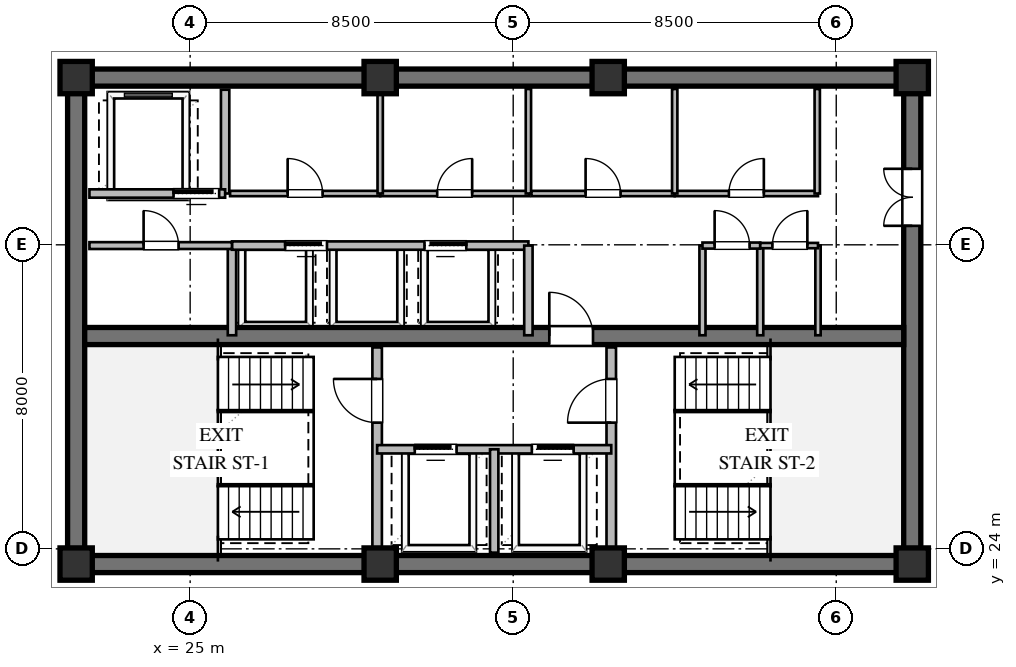
"""IFC4 building model, lengths in metres.
Left out: names, types, materials, properties, quantities, classifications, styles, units other than length and angle.
Written with IfcOpenShell. Run it as: python <this file> out.ifc"""

import sys

from ifc_helpers import new_model, si_unit, direction, frame, frame_2d, origin, origin_2d, place, context, subcontext, project, spatial, rectangle, extrude, element, fill, save


model = new_model("IFC4")
c1 = context("Model", 3, precision=1e-05, world=origin(), true_north=direction((0.0, 1.0)))
c2 = subcontext(c1, "Body", "Model", "MODEL_VIEW")
j1 = project(units=[si_unit("LENGTHUNIT", "METRE"), si_unit("PLANEANGLEUNIT", "RADIAN")], contexts=[c1])
p1 = place(None, origin())
s1 = spatial("IfcSite", under=j1, at=p1, CompositionType="ELEMENT")
p2 = place(p1, origin())
s2 = spatial("IfcBuilding", under=s1, at=p2, CompositionType="ELEMENT")
p3 = place(p2, frame((0.0, 0.0, 206.4)))
s3 = spatial("IfcBuildingStorey", under=s2, at=p3, CompositionType="ELEMENT", Elevation=206.4)
for number, where, z_axis, x_axis in (
    (1, (21.775, 23.6, 0.0), (0.0, 0.0, 1.0), (1.0, 0.0, 0.0)),
    (2, (21.775, 36.4, 0.0), (0.0, 0.0, 1.0), (1.0, 0.0, 0.0)),
):
    element("IfcWall", number, at=place(p3, frame(where, z_axis=z_axis, x_axis=x_axis)), inside=s3, PredefinedType="SHEAR", context=c2, shape_type="SweptSolid", body=[
        extrude(rectangle(XDim=22.45, YDim=0.45, at=frame_2d((11.225, 0.0))), origin(), (0.0, 0.0, 1.0), 3.36),
    ])
p4 = place(p3, frame((22.0, 23.825, 0.0), z_axis=(0.0, 0.0, 1.0), x_axis=(0.0, 1.0, 0.0)))
e3 = element("IfcWall", 3, at=p4, inside=s3, PredefinedType="SHEAR", context=c2, shape_type="SweptSolid", body=[
    extrude(rectangle(XDim=12.35, YDim=0.45, at=frame_2d((6.175, 0.0))), origin(), (0.0, 0.0, 1.0), 3.36),
])
p5 = place(p3, frame((44.0, 23.825, 0.0), z_axis=(0.0, 0.0, 1.0), x_axis=(0.0, 1.0, 0.0)))
e4 = element("IfcWall", 4, at=p5, inside=s3, PredefinedType="SHEAR", context=c2, shape_type="SweptSolid", body=[
    extrude(rectangle(XDim=12.35, YDim=0.45, at=frame_2d((6.175, 0.0))), origin(), (0.0, 0.0, 1.0), 3.36),
])
p6 = place(p5, frame((8.675, 0.0, 0.0)))
e5 = element("IfcOpeningElement", 5, at=p6, cuts=e4, PredefinedType="OPENING", context=c2, shape_type="SweptSolid", body=[
    extrude(rectangle(XDim=1.5, YDim=2.15, at=frame_2d((0.75, 1.075))), frame((0.0, 0.235, 0.0), z_axis=(0.0, -1.0, 0.0), x_axis=(1.0, 0.0, 0.0)), (0.0, 0.0, 1.0), 0.47),
])
p7 = place(p3, frame((22.225, 29.6, 0.0), z_axis=(0.0, 0.0, 1.0), x_axis=(1.0, 0.0, 0.0)))
e6 = element("IfcWall", 6, at=p7, inside=s3, PredefinedType="SHEAR", context=c2, shape_type="SweptSolid", body=[
    extrude(rectangle(XDim=21.55, YDim=0.45, at=frame_2d((10.775, 0.0))), origin(), (0.0, 0.0, 1.0), 3.36),
])
p8 = place(p7, frame((12.225, 0.0, 0.0)))
e7 = element("IfcOpeningElement", 7, at=p8, cuts=e6, PredefinedType="OPENING", context=c2, shape_type="SweptSolid", body=[
    extrude(rectangle(XDim=1.15, YDim=2.1, at=frame_2d((0.575, 1.05))), frame((0.0, 0.235, 0.0), z_axis=(0.0, -1.0, 0.0), x_axis=(1.0, 0.0, 0.0)), (0.0, 0.0, 1.0), 0.47),
])
for number, where, z_axis, x_axis in (
    (8, (22.0, 23.6, 0.0), (0.0, 0.0, 1.0), (1.0, 0.0, 0.0)),
    (9, (30.0, 23.6, 0.0), (0.0, 0.0, 1.0), (1.0, 0.0, 0.0)),
    (10, (36.0, 23.6, 0.0), (0.0, 0.0, 1.0), (1.0, 0.0, 0.0)),
    (11, (44.0, 23.6, 0.0), (0.0, 0.0, 1.0), (1.0, 0.0, 0.0)),
    (12, (44.0, 36.4, 0.0), (0.0, 0.0, 1.0), (1.0, 0.0, 0.0)),
    (13, (36.0, 36.4, 0.0), (0.0, 0.0, 1.0), (1.0, 0.0, 0.0)),
    (14, (30.0, 36.4, 0.0), (0.0, 0.0, 1.0), (1.0, 0.0, 0.0)),
    (15, (22.0, 36.4, 0.0), (0.0, 0.0, 1.0), (1.0, 0.0, 0.0)),
):
    element("IfcColumn", number, at=place(p3, frame(where, z_axis=z_axis, x_axis=x_axis)), inside=s3, PredefinedType="COLUMN", context=c2, shape_type="SweptSolid", body=[
        extrude(rectangle(XDim=0.85, YDim=0.85, at=origin_2d()), origin(), (0.0, 0.0, 1.0), 3.6),
    ])
p9 = place(p3, frame((29.92, 23.9, 0.0), z_axis=(0.0, 0.0, 1.0), x_axis=(0.0, 1.0, 0.0)))
e16 = element("IfcWall", 16, at=p9, inside=s3, PredefinedType="SOLIDWALL", context=c2, shape_type="SweptSolid", body=[
    extrude(rectangle(XDim=5.4, YDim=0.25, at=frame_2d((2.7, 0.0))), origin(), (0.0, 0.0, 1.0), 3.36),
])
p10 = place(p9, frame((3.421, 0.0, 0.0)))
e17 = element("IfcOpeningElement", 17, at=p10, cuts=e16, PredefinedType="OPENING", context=c2, shape_type="SweptSolid", body=[
    extrude(rectangle(XDim=1.15, YDim=2.1, at=frame_2d((0.575, 1.05))), frame((0.0, 0.135, 0.0), z_axis=(0.0, -1.0, 0.0), x_axis=(1.0, 0.0, 0.0)), (0.0, 0.0, 1.0), 0.27),
])
p11 = place(p3, frame((36.08, 23.9, 0.0), z_axis=(0.0, 0.0, 1.0), x_axis=(0.0, 1.0, 0.0)))
e18 = element("IfcWall", 18, at=p11, inside=s3, PredefinedType="SOLIDWALL", context=c2, shape_type="SweptSolid", body=[
    extrude(rectangle(XDim=5.4, YDim=0.25, at=frame_2d((2.7, 0.0))), origin(), (0.0, 0.0, 1.0), 3.36),
])
p12 = place(p11, frame((3.421, 0.0, 0.0)))
e19 = element("IfcOpeningElement", 19, at=p12, cuts=e18, PredefinedType="OPENING", context=c2, shape_type="SweptSolid", body=[
    extrude(rectangle(XDim=1.15, YDim=2.1, at=frame_2d((0.575, 1.05))), frame((0.0, 0.135, 0.0), z_axis=(0.0, -1.0, 0.0), x_axis=(1.0, 0.0, 0.0)), (0.0, 0.0, 1.0), 0.27),
])
p13 = place(p3, frame((29.92, 26.62, 0.0), z_axis=(0.0, 0.0, 1.0), x_axis=(1.0, 0.0, 0.0)))
e20 = element("IfcWall", 20, at=p13, inside=s3, PredefinedType="SOLIDWALL", context=c2, shape_type="SweptSolid", body=[
    extrude(rectangle(XDim=6.16, YDim=0.22, at=frame_2d((3.08, 0.0))), origin(), (0.0, 0.0, 1.0), 3.36),
])
p14 = place(p13, frame((0.99, 0.0, 0.0)))
e21 = element("IfcOpeningElement", 21, at=p14, cuts=e20, PredefinedType="OPENING", context=c2, shape_type="SweptSolid", body=[
    extrude(rectangle(XDim=1.1, YDim=2.1, at=frame_2d((0.55, 1.05))), frame((0.0, 0.12, 0.0), z_axis=(0.0, -1.0, 0.0), x_axis=(1.0, 0.0, 0.0)), (0.0, 0.0, 1.0), 0.24),
])
p15 = place(p13, frame((4.07, 0.0, 0.0)))
e22 = element("IfcOpeningElement", 22, at=p15, cuts=e20, PredefinedType="OPENING", context=c2, shape_type="SweptSolid", body=[
    extrude(rectangle(XDim=1.1, YDim=2.1, at=frame_2d((0.55, 1.05))), frame((0.0, 0.12, 0.0), z_axis=(0.0, -1.0, 0.0), x_axis=(1.0, 0.0, 0.0)), (0.0, 0.0, 1.0), 0.24),
])
p16 = place(p3, frame((33.0, 23.9, 0.0), z_axis=(0.0, 0.0, 1.0), x_axis=(0.0, 1.0, 0.0)))
e23 = element("IfcWall", 23, at=p16, inside=s3, PredefinedType="SOLIDWALL", context=c2, shape_type="SweptSolid", body=[
    extrude(rectangle(XDim=2.72, YDim=0.22, at=frame_2d((1.36, 0.0))), origin(), (0.0, 0.0, 1.0), 3.36),
])
p17 = place(p3, frame((25.92, 33.35, 0.0), z_axis=(0.0, 0.0, 1.0), x_axis=(0.0, 1.0, 0.0)))
e24 = element("IfcWall", 24, at=p17, inside=s3, PredefinedType="SOLIDWALL", context=c2, shape_type="SweptSolid", body=[
    extrude(rectangle(XDim=2.73, YDim=0.22, at=frame_2d((1.365, 0.0))), origin(), (0.0, 0.0, 1.0), 3.36),
])
p18 = place(p3, frame((22.35, 33.35, 0.0), z_axis=(0.0, 0.0, 1.0), x_axis=(1.0, 0.0, 0.0)))
e25 = element("IfcWall", 25, at=p18, inside=s3, PredefinedType="SOLIDWALL", context=c2, shape_type="SweptSolid", body=[
    extrude(rectangle(XDim=3.57, YDim=0.22, at=frame_2d((1.785, 0.0))), origin(), (0.0, 0.0, 1.0), 3.36),
])
p19 = place(p18, frame((2.213, 0.0, 0.0)))
e26 = element("IfcOpeningElement", 26, at=p19, cuts=e25, PredefinedType="OPENING", context=c2, shape_type="SweptSolid", body=[
    extrude(rectangle(XDim=1.2, YDim=2.1, at=frame_2d((0.6, 1.05))), frame((0.0, 0.12, 0.0), z_axis=(0.0, -1.0, 0.0), x_axis=(1.0, 0.0, 0.0)), (0.0, 0.0, 1.0), 0.24),
])
p20 = place(p3, frame((26.1, 29.62, 0.0), z_axis=(0.0, 0.0, 1.0), x_axis=(0.0, 1.0, 0.0)))
e27 = element("IfcWall", 27, at=p20, inside=s3, PredefinedType="SOLIDWALL", context=c2, shape_type="SweptSolid", body=[
    extrude(rectangle(XDim=2.36, YDim=0.22, at=frame_2d((1.18, 0.0))), origin(), (0.0, 0.0, 1.0), 3.36),
])
p21 = place(p3, frame((26.1, 31.98, 0.0), z_axis=(0.0, 0.0, 1.0), x_axis=(1.0, 0.0, 0.0)))
e28 = element("IfcWall", 28, at=p21, inside=s3, PredefinedType="SOLIDWALL", context=c2, shape_type="SweptSolid", body=[
    extrude(rectangle(XDim=7.8, YDim=0.22, at=frame_2d((3.9, 0.0))), origin(), (0.0, 0.0, 1.0), 3.36),
])
p22 = place(p21, frame((1.4, 0.0, 0.0)))
e29 = element("IfcOpeningElement", 29, at=p22, cuts=e28, PredefinedType="OPENING", context=c2, shape_type="SweptSolid", body=[
    extrude(rectangle(XDim=1.1, YDim=2.1, at=frame_2d((0.55, 1.05))), frame((0.0, 0.12, 0.0), z_axis=(0.0, -1.0, 0.0), x_axis=(1.0, 0.0, 0.0)), (0.0, 0.0, 1.0), 0.24),
])
p23 = place(p21, frame((5.066, 0.0, 0.0)))
e30 = element("IfcOpeningElement", 30, at=p23, cuts=e28, PredefinedType="OPENING", context=c2, shape_type="SweptSolid", body=[
    extrude(rectangle(XDim=1.1, YDim=2.1, at=frame_2d((0.55, 1.05))), frame((0.0, 0.12, 0.0), z_axis=(0.0, -1.0, 0.0), x_axis=(1.0, 0.0, 0.0)), (0.0, 0.0, 1.0), 0.24),
])
p24 = place(p3, frame((33.9, 29.62, 0.0), z_axis=(0.0, 0.0, 1.0), x_axis=(0.0, 1.0, 0.0)))
e31 = element("IfcWall", 31, at=p24, inside=s3, PredefinedType="SOLIDWALL", context=c2, shape_type="SweptSolid", body=[
    extrude(rectangle(XDim=2.36, YDim=0.22, at=frame_2d((1.18, 0.0))), origin(), (0.0, 0.0, 1.0), 3.36),
])
p25 = place(p3, frame((26.05, 33.35, 0.0), z_axis=(0.0, 0.0, 1.0), x_axis=(1.0, 0.0, 0.0)))
e32 = element("IfcWall", 32, at=p25, inside=s3, PredefinedType="PARTITIONING", context=c2, shape_type="SweptSolid", body=[
    extrude(rectangle(XDim=3.95, YDim=0.14, at=frame_2d((1.975, 0.0))), origin(), (0.0, 0.0, 1.0), 3.36),
])
p26 = place(p25, frame((1.515, 0.0, 0.0)))
e33 = element("IfcOpeningElement", 33, at=p26, cuts=e32, PredefinedType="OPENING", context=c2, shape_type="SweptSolid", body=[
    extrude(rectangle(XDim=0.92, YDim=2.1, at=frame_2d((0.46, 1.05))), frame((0.0, 0.08, 0.0), z_axis=(0.0, -1.0, 0.0), x_axis=(1.0, 0.0, 0.0)), (0.0, 0.0, 1.0), 0.16),
])
p27 = place(p3, frame((30.0, 33.35, 0.0), z_axis=(0.0, 0.0, 1.0), x_axis=(1.0, 0.0, 0.0)))
e34 = element("IfcWall", 34, at=p27, inside=s3, PredefinedType="PARTITIONING", context=c2, shape_type="SweptSolid", body=[
    extrude(rectangle(XDim=3.92, YDim=0.14, at=frame_2d((1.96, 0.0))), origin(), (0.0, 0.0, 1.0), 3.36),
])
p28 = place(p27, frame((1.5, 0.0, 0.0)))
e35 = element("IfcOpeningElement", 35, at=p28, cuts=e34, PredefinedType="OPENING", context=c2, shape_type="SweptSolid", body=[
    extrude(rectangle(XDim=0.92, YDim=2.1, at=frame_2d((0.46, 1.05))), frame((0.0, 0.08, 0.0), z_axis=(0.0, -1.0, 0.0), x_axis=(1.0, 0.0, 0.0)), (0.0, 0.0, 1.0), 0.16),
])
for number, where, z_axis, x_axis in (
    (36, (30.0, 33.35, 0.0), (0.0, 0.0, 1.0), (0.0, 1.0, 0.0)),
    (37, (33.9, 33.35, 0.0), (0.0, 0.0, 1.0), (0.0, 1.0, 0.0)),
):
    element("IfcWall", number, at=place(p3, frame(where, z_axis=z_axis, x_axis=x_axis)), inside=s3, PredefinedType="PARTITIONING", context=c2, shape_type="SweptSolid", body=[
        extrude(rectangle(XDim=2.75, YDim=0.14, at=frame_2d((1.375, 0.0))), origin(), (0.0, 0.0, 1.0), 3.36),
    ])
p29 = place(p3, frame((33.98, 33.35, 0.0), z_axis=(0.0, 0.0, 1.0), x_axis=(1.0, 0.0, 0.0)))
e38 = element("IfcWall", 38, at=p29, inside=s3, PredefinedType="PARTITIONING", context=c2, shape_type="SweptSolid", body=[
    extrude(rectangle(XDim=3.77, YDim=0.14, at=frame_2d((1.885, 0.0))), origin(), (0.0, 0.0, 1.0), 3.36),
])
p30 = place(p29, frame((1.425, 0.0, 0.0)))
e39 = element("IfcOpeningElement", 39, at=p30, cuts=e38, PredefinedType="OPENING", context=c2, shape_type="SweptSolid", body=[
    extrude(rectangle(XDim=0.92, YDim=2.1, at=frame_2d((0.46, 1.05))), frame((0.0, 0.08, 0.0), z_axis=(0.0, -1.0, 0.0), x_axis=(1.0, 0.0, 0.0)), (0.0, 0.0, 1.0), 0.16),
])
p31 = place(p3, frame((37.75, 33.35, 0.0), z_axis=(0.0, 0.0, 1.0), x_axis=(1.0, 0.0, 0.0)))
e40 = element("IfcWall", 40, at=p31, inside=s3, PredefinedType="PARTITIONING", context=c2, shape_type="SweptSolid", body=[
    extrude(rectangle(XDim=3.77, YDim=0.14, at=frame_2d((1.885, 0.0))), origin(), (0.0, 0.0, 1.0), 3.36),
])
p32 = place(p31, frame((1.425, 0.0, 0.0)))
e41 = element("IfcOpeningElement", 41, at=p32, cuts=e40, PredefinedType="OPENING", context=c2, shape_type="SweptSolid", body=[
    extrude(rectangle(XDim=0.92, YDim=2.1, at=frame_2d((0.46, 1.05))), frame((0.0, 0.08, 0.0), z_axis=(0.0, -1.0, 0.0), x_axis=(1.0, 0.0, 0.0)), (0.0, 0.0, 1.0), 0.16),
])
for number, where, z_axis, x_axis in (
    (42, (37.75, 33.35, 0.0), (0.0, 0.0, 1.0), (0.0, 1.0, 0.0)),
    (43, (41.5, 33.35, 0.0), (0.0, 0.0, 1.0), (0.0, 1.0, 0.0)),
):
    element("IfcWall", number, at=place(p3, frame(where, z_axis=z_axis, x_axis=x_axis)), inside=s3, PredefinedType="PARTITIONING", context=c2, shape_type="SweptSolid", body=[
        extrude(rectangle(XDim=2.75, YDim=0.14, at=frame_2d((1.375, 0.0))), origin(), (0.0, 0.0, 1.0), 3.36),
    ])
p33 = place(p3, frame((22.35, 31.98, 0.0), z_axis=(0.0, 0.0, 1.0), x_axis=(1.0, 0.0, 0.0)))
e44 = element("IfcWall", 44, at=p33, inside=s3, PredefinedType="PARTITIONING", context=c2, shape_type="SweptSolid", body=[
    extrude(rectangle(XDim=3.75, YDim=0.18, at=frame_2d((1.875, 0.0))), origin(), (0.0, 0.0, 1.0), 3.36),
])
p34 = place(p33, frame((1.425, 0.0, 0.0)))
e45 = element("IfcOpeningElement", 45, at=p34, cuts=e44, PredefinedType="OPENING", context=c2, shape_type="SweptSolid", body=[
    extrude(rectangle(XDim=0.92, YDim=2.1, at=frame_2d((0.46, 1.05))), frame((0.0, 0.1, 0.0), z_axis=(0.0, -1.0, 0.0), x_axis=(1.0, 0.0, 0.0)), (0.0, 0.0, 1.0), 0.2),
])
for number, where, z_axis, x_axis in (
    (46, (38.48, 29.62, 0.0), (0.0, 0.0, 1.0), (0.0, 1.0, 0.0)),
    (47, (40.0, 29.62, 0.0), (0.0, 0.0, 1.0), (0.0, 1.0, 0.0)),
):
    element("IfcWall", number, at=place(p3, frame(where, z_axis=z_axis, x_axis=x_axis)), inside=s3, PredefinedType="PLUMBINGWALL", context=c2, shape_type="SweptSolid", body=[
        extrude(rectangle(XDim=2.36, YDim=0.16, at=frame_2d((1.18, 0.0))), origin(), (0.0, 0.0, 1.0), 3.36),
    ])
p35 = place(p3, frame((41.52, 29.62, 0.0), z_axis=(0.0, 0.0, 1.0), x_axis=(0.0, 1.0, 0.0)))
e48 = element("IfcWall", 48, at=p35, inside=s3, PredefinedType="PARTITIONING", context=c2, shape_type="SweptSolid", body=[
    extrude(rectangle(XDim=2.36, YDim=0.14, at=frame_2d((1.18, 0.0))), origin(), (0.0, 0.0, 1.0), 3.36),
])
p36 = place(p3, frame((38.48, 31.98, 0.0), z_axis=(0.0, 0.0, 1.0), x_axis=(1.0, 0.0, 0.0)))
e49 = element("IfcWall", 49, at=p36, inside=s3, PredefinedType="PLUMBINGWALL", context=c2, shape_type="SweptSolid", body=[
    extrude(rectangle(XDim=1.52, YDim=0.16, at=frame_2d((0.76, 0.0))), origin(), (0.0, 0.0, 1.0), 3.36),
])
p37 = place(p36, frame((0.32, 0.0, 0.0)))
e50 = element("IfcOpeningElement", 50, at=p37, cuts=e49, PredefinedType="OPENING", context=c2, shape_type="SweptSolid", body=[
    extrude(rectangle(XDim=0.92, YDim=2.1, at=frame_2d((0.46, 1.05))), frame((0.0, 0.09, 0.0), z_axis=(0.0, -1.0, 0.0), x_axis=(1.0, 0.0, 0.0)), (0.0, 0.0, 1.0), 0.18),
])
p38 = place(p3, frame((40.0, 31.98, 0.0), z_axis=(0.0, 0.0, 1.0), x_axis=(1.0, 0.0, 0.0)))
e51 = element("IfcWall", 51, at=p38, inside=s3, PredefinedType="PARTITIONING", context=c2, shape_type="SweptSolid", body=[
    extrude(rectangle(XDim=1.52, YDim=0.14, at=frame_2d((0.76, 0.0))), origin(), (0.0, 0.0, 1.0), 3.36),
])
p39 = place(p38, frame((0.32, 0.0, 0.0)))
e52 = element("IfcOpeningElement", 52, at=p39, cuts=e51, PredefinedType="OPENING", context=c2, shape_type="SweptSolid", body=[
    extrude(rectangle(XDim=0.92, YDim=2.1, at=frame_2d((0.46, 1.05))), frame((0.0, 0.08, 0.0), z_axis=(0.0, -1.0, 0.0), x_axis=(1.0, 0.0, 0.0)), (0.0, 0.0, 1.0), 0.16),
])
p40 = place(p10, origin())
e53 = element("IfcDoor", 53, at=p40, inside=s3, OperationType="SINGLE_SWING_RIGHT", PredefinedType="DOOR", context=c2, shape_type="SweptSolid", body=[
    extrude(rectangle(XDim=1.15, YDim=2.1, at=frame_2d((0.575, 1.05))), frame((0.0, 0.025, 0.0), z_axis=(0.0, -1.0, 0.0), x_axis=(1.0, 0.0, 0.0)), (0.0, 0.0, 1.0), 0.05),
])
fill(e17, e53)
p41 = place(p12, origin())
e54 = element("IfcDoor", 54, at=p41, inside=s3, OperationType="SINGLE_SWING_LEFT", PredefinedType="DOOR", context=c2, shape_type="SweptSolid", body=[
    extrude(rectangle(XDim=1.15, YDim=2.1, at=frame_2d((0.575, 1.05))), frame((0.0, 0.025, 0.0), z_axis=(0.0, -1.0, 0.0), x_axis=(1.0, 0.0, 0.0)), (0.0, 0.0, 1.0), 0.05),
])
fill(e19, e54)
p42 = place(p14, origin())
e55 = element("IfcDoor", 55, at=p42, inside=s3, OperationType="SLIDING_TO_LEFT", PredefinedType="DOOR", context=c2, shape_type="SweptSolid", body=[
    extrude(rectangle(XDim=1.1, YDim=2.1, at=frame_2d((0.55, 1.05))), frame((0.0, 0.025, 0.0), z_axis=(0.0, -1.0, 0.0), x_axis=(1.0, 0.0, 0.0)), (0.0, 0.0, 1.0), 0.05),
])
fill(e21, e55)
p43 = place(p15, origin())
e56 = element("IfcDoor", 56, at=p43, inside=s3, OperationType="SLIDING_TO_RIGHT", PredefinedType="DOOR", context=c2, shape_type="SweptSolid", body=[
    extrude(rectangle(XDim=1.1, YDim=2.1, at=frame_2d((0.55, 1.05))), frame((0.0, 0.025, 0.0), z_axis=(0.0, -1.0, 0.0), x_axis=(1.0, 0.0, 0.0)), (0.0, 0.0, 1.0), 0.05),
])
fill(e22, e56)
p44 = place(p8, origin())
e57 = element("IfcDoor", 57, at=p44, inside=s3, OperationType="SINGLE_SWING_LEFT", PredefinedType="DOOR", context=c2, shape_type="SweptSolid", body=[
    extrude(rectangle(XDim=1.15, YDim=2.1, at=frame_2d((0.575, 1.05))), frame((0.0, 0.025, 0.0), z_axis=(0.0, -1.0, 0.0), x_axis=(1.0, 0.0, 0.0)), (0.0, 0.0, 1.0), 0.05),
])
fill(e7, e57)
p45 = place(p6, origin())
e58 = element("IfcDoor", 58, at=p45, inside=s3, OperationType="DOUBLE_DOOR_SINGLE_SWING", PredefinedType="DOOR", context=c2, shape_type="SweptSolid", body=[
    extrude(rectangle(XDim=1.5, YDim=2.15, at=frame_2d((0.75, 1.075))), frame((0.0, 0.025, 0.0), z_axis=(0.0, -1.0, 0.0), x_axis=(1.0, 0.0, 0.0)), (0.0, 0.0, 1.0), 0.05),
])
fill(e5, e58)
p46 = place(p19, origin())
e59 = element("IfcDoor", 59, at=p46, inside=s3, OperationType="SLIDING_TO_LEFT", PredefinedType="DOOR", context=c2, shape_type="SweptSolid", body=[
    extrude(rectangle(XDim=1.2, YDim=2.1, at=frame_2d((0.6, 1.05))), frame((0.0, 0.025, 0.0), z_axis=(0.0, -1.0, 0.0), x_axis=(1.0, 0.0, 0.0)), (0.0, 0.0, 1.0), 0.05),
])
fill(e26, e59)
p47 = place(p22, origin())
e60 = element("IfcDoor", 60, at=p47, inside=s3, OperationType="SLIDING_TO_LEFT", PredefinedType="DOOR", context=c2, shape_type="SweptSolid", body=[
    extrude(rectangle(XDim=1.1, YDim=2.1, at=frame_2d((0.55, 1.05))), frame((0.0, 0.025, 0.0), z_axis=(0.0, -1.0, 0.0), x_axis=(1.0, 0.0, 0.0)), (0.0, 0.0, 1.0), 0.05),
])
fill(e29, e60)
p48 = place(p23, origin())
e61 = element("IfcDoor", 61, at=p48, inside=s3, OperationType="SLIDING_TO_RIGHT", PredefinedType="DOOR", context=c2, shape_type="SweptSolid", body=[
    extrude(rectangle(XDim=1.1, YDim=2.1, at=frame_2d((0.55, 1.05))), frame((0.0, 0.025, 0.0), z_axis=(0.0, -1.0, 0.0), x_axis=(1.0, 0.0, 0.0)), (0.0, 0.0, 1.0), 0.05),
])
fill(e30, e61)
p49 = place(p26, origin())
e62 = element("IfcDoor", 62, at=p49, inside=s3, OperationType="SINGLE_SWING_LEFT", PredefinedType="DOOR", context=c2, shape_type="SweptSolid", body=[
    extrude(rectangle(XDim=0.92, YDim=2.1, at=frame_2d((0.46, 1.05))), frame((0.0, 0.025, 0.0), z_axis=(0.0, -1.0, 0.0), x_axis=(1.0, 0.0, 0.0)), (0.0, 0.0, 1.0), 0.05),
])
fill(e33, e62)
p50 = place(p28, origin())
e63 = element("IfcDoor", 63, at=p50, inside=s3, OperationType="SINGLE_SWING_RIGHT", PredefinedType="DOOR", context=c2, shape_type="SweptSolid", body=[
    extrude(rectangle(XDim=0.92, YDim=2.1, at=frame_2d((0.46, 1.05))), frame((0.0, 0.025, 0.0), z_axis=(0.0, -1.0, 0.0), x_axis=(1.0, 0.0, 0.0)), (0.0, 0.0, 1.0), 0.05),
])
fill(e35, e63)
p51 = place(p30, origin())
e64 = element("IfcDoor", 64, at=p51, inside=s3, OperationType="SINGLE_SWING_LEFT", PredefinedType="DOOR", context=c2, shape_type="SweptSolid", body=[
    extrude(rectangle(XDim=0.92, YDim=2.1, at=frame_2d((0.46, 1.05))), frame((0.0, 0.025, 0.0), z_axis=(0.0, -1.0, 0.0), x_axis=(1.0, 0.0, 0.0)), (0.0, 0.0, 1.0), 0.05),
])
fill(e39, e64)
p52 = place(p32, origin())
e65 = element("IfcDoor", 65, at=p52, inside=s3, OperationType="SINGLE_SWING_RIGHT", PredefinedType="DOOR", context=c2, shape_type="SweptSolid", body=[
    extrude(rectangle(XDim=0.92, YDim=2.1, at=frame_2d((0.46, 1.05))), frame((0.0, 0.025, 0.0), z_axis=(0.0, -1.0, 0.0), x_axis=(1.0, 0.0, 0.0)), (0.0, 0.0, 1.0), 0.05),
])
fill(e41, e65)
p53 = place(p34, origin())
e66 = element("IfcDoor", 66, at=p53, inside=s3, OperationType="SINGLE_SWING_LEFT", PredefinedType="DOOR", context=c2, shape_type="SweptSolid", body=[
    extrude(rectangle(XDim=0.92, YDim=2.1, at=frame_2d((0.46, 1.05))), frame((0.0, 0.025, 0.0), z_axis=(0.0, -1.0, 0.0), x_axis=(1.0, 0.0, 0.0)), (0.0, 0.0, 1.0), 0.05),
])
fill(e45, e66)
p54 = place(p37, origin())
e67 = element("IfcDoor", 67, at=p54, inside=s3, OperationType="SINGLE_SWING_LEFT", PredefinedType="DOOR", context=c2, shape_type="SweptSolid", body=[
    extrude(rectangle(XDim=0.92, YDim=2.1, at=frame_2d((0.46, 1.05))), frame((0.0, 0.025, 0.0), z_axis=(0.0, -1.0, 0.0), x_axis=(1.0, 0.0, 0.0)), (0.0, 0.0, 1.0), 0.05),
])
fill(e50, e67)
p55 = place(p39, origin())
e68 = element("IfcDoor", 68, at=p55, inside=s3, OperationType="SINGLE_SWING_RIGHT", PredefinedType="DOOR", context=c2, shape_type="SweptSolid", body=[
    extrude(rectangle(XDim=0.92, YDim=2.1, at=frame_2d((0.46, 1.05))), frame((0.0, 0.025, 0.0), z_axis=(0.0, -1.0, 0.0), x_axis=(1.0, 0.0, 0.0)), (0.0, 0.0, 1.0), 0.05),
])
fill(e52, e68)
save(model, sys.argv[1])
